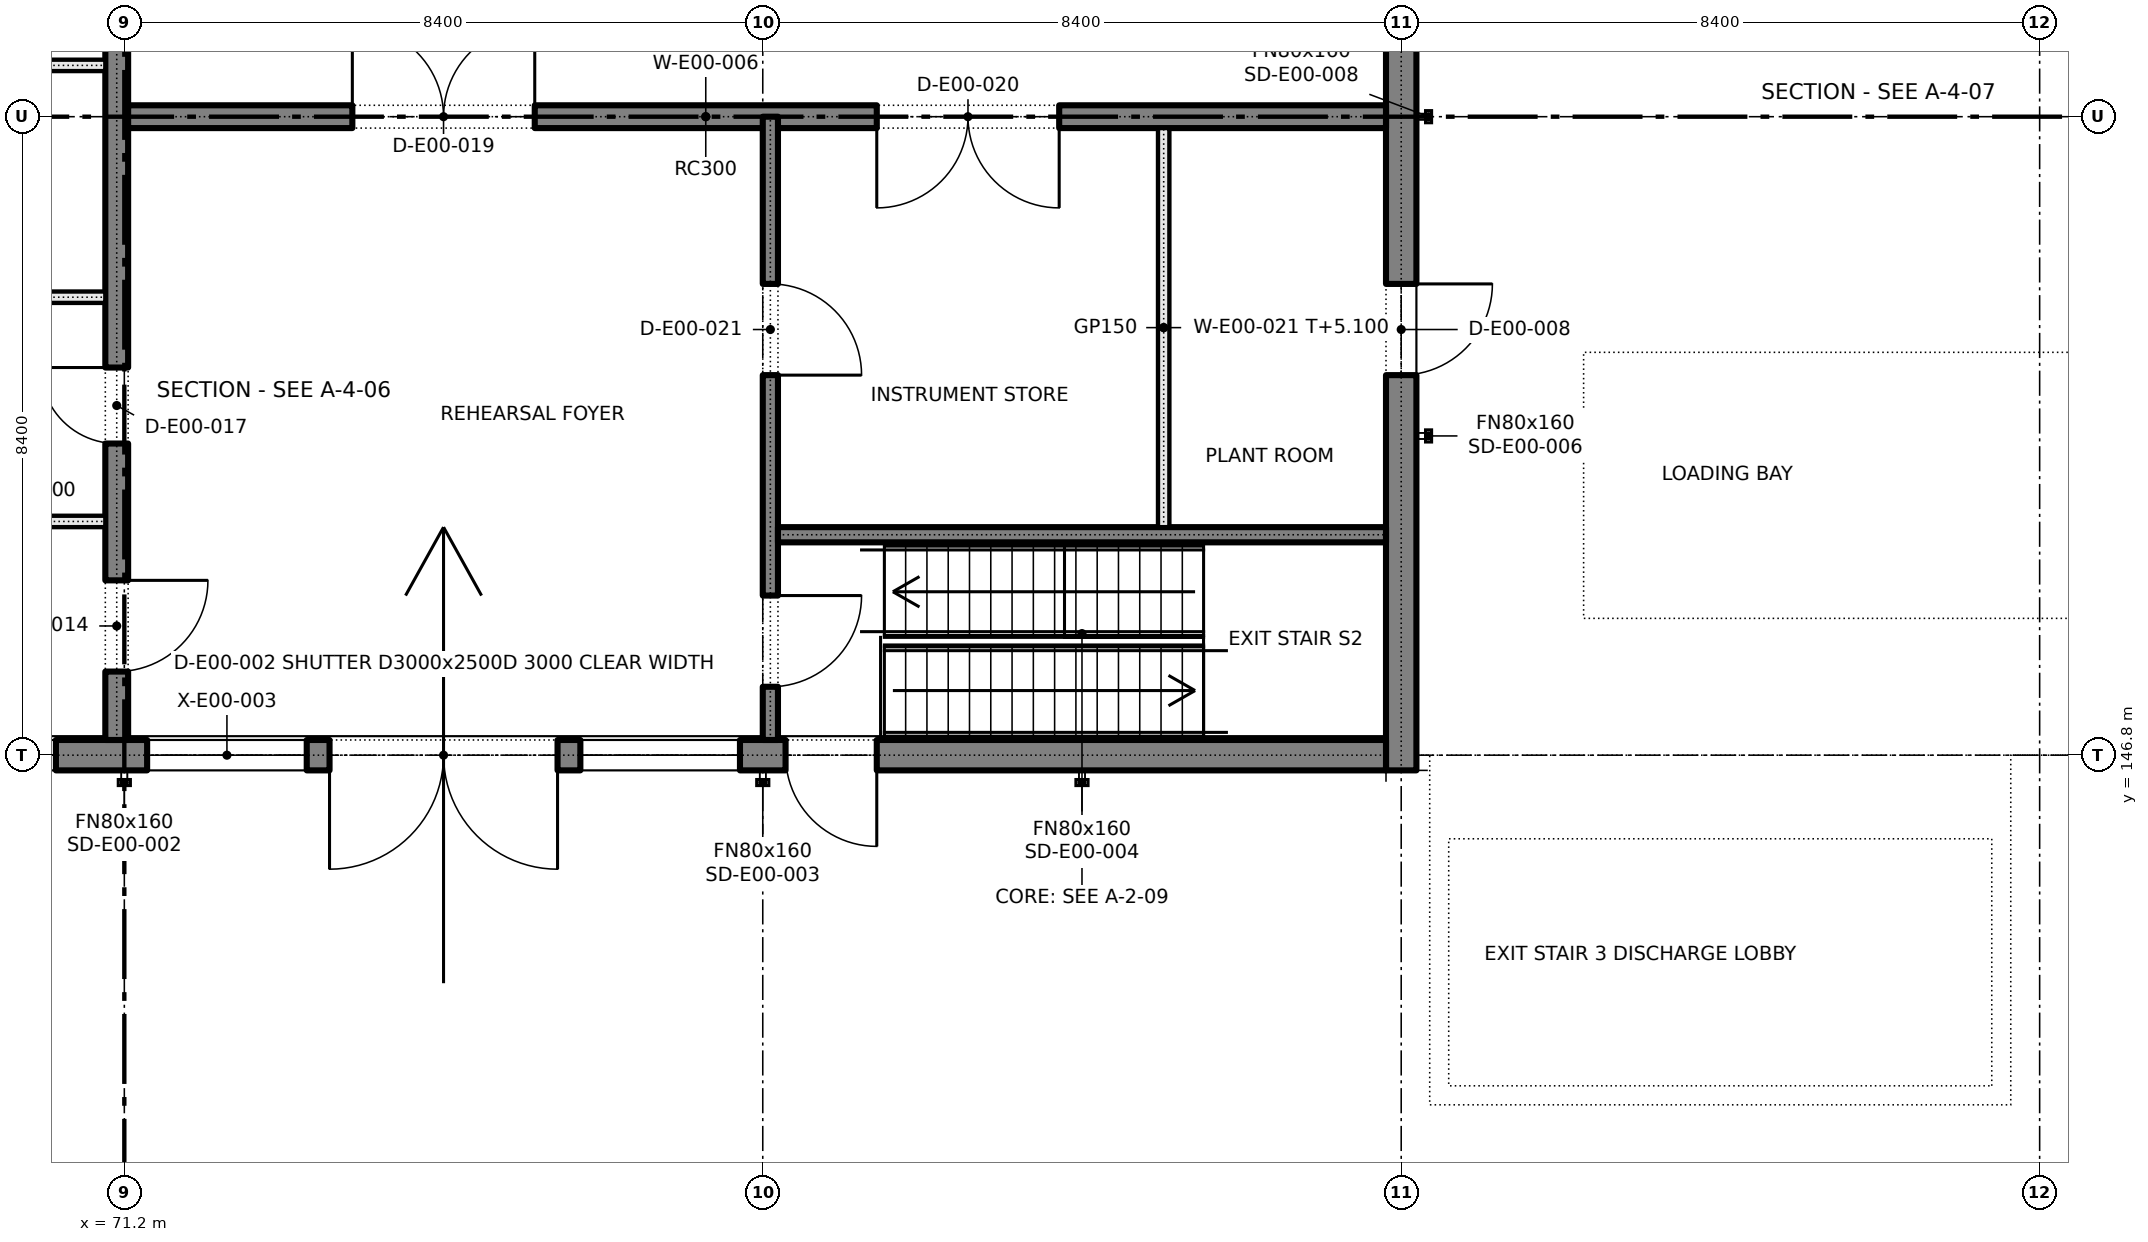
"""IFC4 building model, lengths in metres.
Left out: names, types, materials, properties, quantities, classifications, styles, units other than length and angle.
Written with IfcOpenShell. Run it as: python <this file> out.ifc"""

import sys

from ifc_helpers import new_model, si_unit, direction, frame, frame_2d, origin, place, context, subcontext, project, spatial, rectangle, extrude, element, fill, save


model = new_model("IFC4")
c1 = context("Model", 3, precision=1e-05, world=origin(), true_north=direction((0.0, 1.0)))
c2 = subcontext(c1, "Body", "Model", "MODEL_VIEW")
j1 = project(units=[si_unit("LENGTHUNIT", "METRE"), si_unit("PLANEANGLEUNIT", "RADIAN")], contexts=[c1])
p1 = place(None, origin())
s1 = spatial("IfcSite", under=j1, at=p1, CompositionType="ELEMENT")
p2 = place(p1, origin())
s2 = spatial("IfcBuilding", under=s1, at=p2, CompositionType="ELEMENT")
p3 = place(p2, origin())
s3 = spatial("IfcBuildingStorey", under=s2, at=p3, CompositionType="ELEMENT", Elevation=0.0)
p4 = place(p3, frame((88.0, 146.6, 0.0), z_axis=(0.0, 0.0, 1.0), x_axis=(0.0, 1.0, 0.0)))
e1 = element("IfcWall", 1, at=p4, inside=s3, PredefinedType="SOLIDWALL", context=c2, shape_type="SweptSolid", body=[
    extrude(rectangle(XDim=25.6, YDim=0.4, at=frame_2d((12.8, 0.0))), origin(), (0.0, 0.0, 1.0), 5.4),
])
p5 = place(p4, frame((11.3, 0.0, 0.0)))
e2 = element("IfcOpeningElement", 2, at=p5, cuts=e1, PredefinedType="OPENING", context=c2, shape_type="SweptSolid", body=[
    extrude(rectangle(XDim=3.0, YDim=2.5, at=frame_2d((1.5, 1.25))), frame((0.0, 0.21, 0.0), z_axis=(0.0, -1.0, 0.0), x_axis=(1.0, 0.0, 0.0)), (0.0, 0.0, 1.0), 0.42),
])
p6 = place(p4, frame((22.4, 0.0, 0.0)))
e3 = element("IfcOpeningElement", 3, at=p6, cuts=e1, PredefinedType="OPENING", context=c2, shape_type="SweptSolid", body=[
    extrude(rectangle(XDim=1.8, YDim=2.1, at=frame_2d((0.9, 1.05))), frame((0.0, 0.21, 0.0), z_axis=(0.0, -1.0, 0.0), x_axis=(1.0, 0.0, 0.0)), (0.0, 0.0, 1.0), 0.42),
])
p7 = place(p4, frame((5.2, 0.0, 0.0)))
e4 = element("IfcOpeningElement", 4, at=p7, cuts=e1, PredefinedType="OPENING", context=c2, shape_type="SweptSolid", body=[
    extrude(rectangle(XDim=1.2, YDim=2.1, at=frame_2d((0.6, 1.05))), frame((0.0, 0.21, 0.0), z_axis=(0.0, -1.0, 0.0), x_axis=(1.0, 0.0, 0.0)), (0.0, 0.0, 1.0), 0.42),
])
p8 = place(p3, frame((63.0, 146.8, 0.0), z_axis=(0.0, 0.0, 1.0), x_axis=(1.0, 0.0, 0.0)))
e5 = element("IfcWall", 5, at=p8, inside=s3, PredefinedType="SOLIDWALL", context=c2, shape_type="SweptSolid", body=[
    extrude(rectangle(XDim=24.8, YDim=0.4, at=frame_2d((12.4, 0.0))), origin(), (0.0, 0.0, 1.0), 5.4),
])
p9 = place(p8, frame((10.9, 0.0, 0.0)))
e6 = element("IfcOpeningElement", 6, at=p9, cuts=e5, PredefinedType="OPENING", context=c2, shape_type="SweptSolid", body=[
    extrude(rectangle(XDim=3.0, YDim=2.5, at=frame_2d((1.5, 1.25))), frame((0.0, 0.21, 0.0), z_axis=(0.0, -1.0, 0.0), x_axis=(1.0, 0.0, 0.0)), (0.0, 0.0, 1.0), 0.42),
])
p10 = place(p8, frame((16.9, 0.0, 0.0)))
e7 = element("IfcOpeningElement", 7, at=p10, cuts=e5, PredefinedType="OPENING", context=c2, shape_type="SweptSolid", body=[
    extrude(rectangle(XDim=1.2, YDim=2.1, at=frame_2d((0.6, 1.05))), frame((0.0, 0.21, 0.0), z_axis=(0.0, -1.0, 0.0), x_axis=(1.0, 0.0, 0.0)), (0.0, 0.0, 1.0), 0.42),
])
p11 = place(p8, frame((0.7, 0.0, 0.9)))
e8 = element("IfcOpeningElement", 8, at=p11, cuts=e5, PredefinedType="OPENING", context=c2, shape_type="SweptSolid", body=[
    extrude(rectangle(XDim=2.4, YDim=2.4, at=frame_2d((1.2, 1.2))), frame((0.0, 0.21, 0.0), z_axis=(0.0, -1.0, 0.0), x_axis=(1.0, 0.0, 0.0)), (0.0, 0.0, 1.0), 0.42),
])
p12 = place(p8, frame((4.9, 0.0, 0.9)))
e9 = element("IfcOpeningElement", 9, at=p12, cuts=e5, PredefinedType="OPENING", context=c2, shape_type="SweptSolid", body=[
    extrude(rectangle(XDim=2.4, YDim=2.4, at=frame_2d((1.2, 1.2))), frame((0.0, 0.21, 0.0), z_axis=(0.0, -1.0, 0.0), x_axis=(1.0, 0.0, 0.0)), (0.0, 0.0, 1.0), 0.42),
])
p13 = place(p8, frame((8.5, 0.0, 0.9)))
e10 = element("IfcOpeningElement", 10, at=p13, cuts=e5, PredefinedType="OPENING", context=c2, shape_type="SweptSolid", body=[
    extrude(rectangle(XDim=2.1, YDim=2.4, at=frame_2d((1.05, 1.2))), frame((0.0, 0.21, 0.0), z_axis=(0.0, -1.0, 0.0), x_axis=(1.0, 0.0, 0.0)), (0.0, 0.0, 1.0), 0.42),
])
p14 = place(p8, frame((14.2, 0.0, 0.9)))
e11 = element("IfcOpeningElement", 11, at=p14, cuts=e5, PredefinedType="OPENING", context=c2, shape_type="SweptSolid", body=[
    extrude(rectangle(XDim=2.1, YDim=2.4, at=frame_2d((1.05, 1.2))), frame((0.0, 0.21, 0.0), z_axis=(0.0, -1.0, 0.0), x_axis=(1.0, 0.0, 0.0)), (0.0, 0.0, 1.0), 0.42),
])
p15 = place(p3, frame((71.1, 147.0, 0.0), z_axis=(0.0, 0.0, 1.0), x_axis=(0.0, 1.0, 0.0)))
e12 = element("IfcWall", 12, at=p15, inside=s3, PredefinedType="SOLIDWALL", context=c2, shape_type="SweptSolid", body=[
    extrude(rectangle(XDim=24.8, YDim=0.3, at=frame_2d((12.4, 0.0))), origin(), (0.0, 0.0, 1.0), 5.4),
])
p16 = place(p15, frame((0.9, 0.0, 0.0)))
e13 = element("IfcOpeningElement", 13, at=p16, cuts=e12, PredefinedType="OPENING", context=c2, shape_type="SweptSolid", body=[
    extrude(rectangle(XDim=1.2, YDim=2.1, at=frame_2d((0.6, 1.05))), frame((0.0, 0.16, 0.0), z_axis=(0.0, -1.0, 0.0), x_axis=(1.0, 0.0, 0.0)), (0.0, 0.0, 1.0), 0.32),
])
p17 = place(p15, frame((3.9, 0.0, 0.0)))
e14 = element("IfcOpeningElement", 14, at=p17, cuts=e12, PredefinedType="OPENING", context=c2, shape_type="SweptSolid", body=[
    extrude(rectangle(XDim=1.0, YDim=2.1, at=frame_2d((0.5, 1.05))), frame((0.0, 0.16, 0.0), z_axis=(0.0, -1.0, 0.0), x_axis=(1.0, 0.0, 0.0)), (0.0, 0.0, 1.0), 0.32),
])
p18 = place(p15, frame((15.9, 0.0, 0.0)))
e15 = element("IfcOpeningElement", 15, at=p18, cuts=e12, PredefinedType="OPENING", context=c2, shape_type="SweptSolid", body=[
    extrude(rectangle(XDim=1.0, YDim=2.1, at=frame_2d((0.5, 1.05))), frame((0.0, 0.16, 0.0), z_axis=(0.0, -1.0, 0.0), x_axis=(1.0, 0.0, 0.0)), (0.0, 0.0, 1.0), 0.32),
])
p19 = place(p3, frame((71.25, 155.2, 0.0), z_axis=(0.0, 0.0, 1.0), x_axis=(1.0, 0.0, 0.0)))
e16 = element("IfcWall", 16, at=p19, inside=s3, PredefinedType="SOLIDWALL", context=c2, shape_type="SweptSolid", body=[
    extrude(rectangle(XDim=16.55, YDim=0.3, at=frame_2d((8.275, 0.0))), origin(), (0.0, 0.0, 1.0), 5.4),
])
p20 = place(p19, frame((2.95, 0.0, 0.0)))
e17 = element("IfcOpeningElement", 17, at=p20, cuts=e16, PredefinedType="OPENING", context=c2, shape_type="SweptSolid", body=[
    extrude(rectangle(XDim=2.4, YDim=2.1, at=frame_2d((1.2, 1.05))), frame((0.0, 0.16, 0.0), z_axis=(0.0, -1.0, 0.0), x_axis=(1.0, 0.0, 0.0)), (0.0, 0.0, 1.0), 0.32),
])
p21 = place(p19, frame((9.85, 0.0, 0.0)))
e18 = element("IfcOpeningElement", 18, at=p21, cuts=e16, PredefinedType="OPENING", context=c2, shape_type="SweptSolid", body=[
    extrude(rectangle(XDim=2.4, YDim=2.1, at=frame_2d((1.2, 1.05))), frame((0.0, 0.16, 0.0), z_axis=(0.0, -1.0, 0.0), x_axis=(1.0, 0.0, 0.0)), (0.0, 0.0, 1.0), 0.32),
])
p22 = place(p3, frame((79.7, 147.0, 0.0), z_axis=(0.0, 0.0, 1.0), x_axis=(0.0, 1.0, 0.0)))
e19 = element("IfcWall", 19, at=p22, inside=s3, PredefinedType="SOLIDWALL", context=c2, shape_type="SweptSolid", body=[
    extrude(rectangle(XDim=8.2, YDim=0.2, at=frame_2d((4.1, 0.0))), origin(), (0.0, 0.0, 1.0), 5.4),
])
p23 = place(p22, frame((0.7, 0.0, 0.0)))
e20 = element("IfcOpeningElement", 20, at=p23, cuts=e19, PredefinedType="OPENING", context=c2, shape_type="SweptSolid", body=[
    extrude(rectangle(XDim=1.2, YDim=2.1, at=frame_2d((0.6, 1.05))), frame((0.0, 0.11, 0.0), z_axis=(0.0, -1.0, 0.0), x_axis=(1.0, 0.0, 0.0)), (0.0, 0.0, 1.0), 0.22),
])
p24 = place(p22, frame((4.8, 0.0, 0.0)))
e21 = element("IfcOpeningElement", 21, at=p24, cuts=e19, PredefinedType="OPENING", context=c2, shape_type="SweptSolid", body=[
    extrude(rectangle(XDim=1.2, YDim=2.1, at=frame_2d((0.6, 1.05))), frame((0.0, 0.11, 0.0), z_axis=(0.0, -1.0, 0.0), x_axis=(1.0, 0.0, 0.0)), (0.0, 0.0, 1.0), 0.22),
])
p25 = place(p3, frame((79.8, 149.7, 0.0), z_axis=(0.0, 0.0, 1.0), x_axis=(1.0, 0.0, 0.0)))
e22 = element("IfcWall", 22, at=p25, inside=s3, PredefinedType="SOLIDWALL", context=c2, shape_type="SweptSolid", body=[
    extrude(rectangle(XDim=8.0, YDim=0.2, at=frame_2d((4.0, 0.0))), origin(), (0.0, 0.0, 1.0), 5.4),
])
p26 = place(p3, frame((88.5, 142.325, 0.0), z_axis=(0.0, 0.0, 1.0), x_axis=(1.0, 0.0, 0.0)))
e23 = element("IfcWall", 23, at=p26, inside=s3, PredefinedType="SOLIDWALL", context=c2, shape_type="SweptSolid", body=[
    extrude(rectangle(XDim=7.395, YDim=0.25, at=frame_2d((3.698, 0.0))), origin(), (0.0, 0.0, 1.0), 2.8),
])
p27 = place(p26, frame((0.55, 0.0, 0.0)))
e24 = element("IfcOpeningElement", 24, at=p27, cuts=e23, PredefinedType="OPENING", context=c2, shape_type="SweptSolid", body=[
    extrude(rectangle(XDim=1.1, YDim=2.1, at=frame_2d((0.55, 1.05))), frame((0.0, 0.135, 0.0), z_axis=(0.0, -1.0, 0.0), x_axis=(1.0, 0.0, 0.0)), (0.0, 0.0, 1.0), 0.27),
])
p28 = place(p3, frame((88.5, 145.825, 0.0), z_axis=(0.0, 0.0, 1.0), x_axis=(1.0, 0.0, 0.0)))
e25 = element("IfcWall", 25, at=p28, inside=s3, PredefinedType="SOLIDWALL", context=c2, shape_type="SweptSolid", body=[
    extrude(rectangle(XDim=7.395, YDim=0.25, at=frame_2d((3.698, 0.0))), origin(), (0.0, 0.0, 1.0), 2.8),
])
for number, where, z_axis, x_axis in (
    (26, (88.5, 142.325, 0.0), (0.0, 0.0, 1.0), (0.0, 1.0, 0.0)),
    (27, (95.895, 142.325, 0.0), (0.0, 0.0, 1.0), (0.0, 1.0, 0.0)),
):
    element("IfcWall", number, at=place(p3, frame(where, z_axis=z_axis, x_axis=x_axis)), inside=s3, PredefinedType="SOLIDWALL", context=c2, shape_type="SweptSolid", body=[
        extrude(rectangle(XDim=3.5, YDim=0.25, at=frame_2d((1.75, 0.0))), origin(), (0.0, 0.0, 1.0), 2.8),
    ])
for number, where, z_axis, x_axis in (
    (28, (64.8, 152.825, 0.0), (0.0, 0.0, 1.0), (1.0, 0.0, 0.0)),
    (29, (64.8, 155.875, 0.0), (0.0, 0.0, 1.0), (1.0, 0.0, 0.0)),
):
    element("IfcWall", number, at=place(p3, frame(where, z_axis=z_axis, x_axis=x_axis)), inside=s3, PredefinedType="PARTITIONING", context=c2, shape_type="SweptSolid", body=[
        extrude(rectangle(XDim=6.15, YDim=0.15, at=frame_2d((3.075, 0.0))), origin(), (0.0, 0.0, 1.0), 5.1),
    ])
p29 = place(p3, frame((67.6, 149.875, 0.0), z_axis=(0.0, 0.0, 1.0), x_axis=(1.0, 0.0, 0.0)))
e30 = element("IfcWall", 30, at=p29, inside=s3, PredefinedType="PARTITIONING", context=c2, shape_type="SweptSolid", body=[
    extrude(rectangle(XDim=3.35, YDim=0.15, at=frame_2d((1.675, 0.0))), origin(), (0.0, 0.0, 1.0), 5.1),
])
p30 = place(p3, frame((84.875, 149.8, 0.0), z_axis=(0.0, 0.0, 1.0), x_axis=(0.0, 1.0, 0.0)))
e31 = element("IfcWall", 31, at=p30, inside=s3, PredefinedType="PARTITIONING", context=c2, shape_type="SweptSolid", body=[
    extrude(rectangle(XDim=5.25, YDim=0.15, at=frame_2d((2.625, 0.0))), origin(), (0.0, 0.0, 1.0), 5.1),
])
p31 = place(p27, frame((1.1, 0.0, 0.0), z_axis=(0.0, 0.0, 1.0), x_axis=(-1.0, 0.0, 0.0)))
e32 = element("IfcDoor", 32, at=p31, inside=s3, OperationType="SINGLE_SWING_RIGHT", PredefinedType="DOOR", context=c2, shape_type="SweptSolid", body=[
    extrude(rectangle(XDim=1.1, YDim=2.1, at=frame_2d((0.55, 1.05))), frame((0.0, 0.025, 0.0), z_axis=(0.0, -1.0, 0.0), x_axis=(1.0, 0.0, 0.0)), (0.0, 0.0, 1.0), 0.05),
])
fill(e24, e32)
p32 = place(p9, frame((3.0, 0.0, 0.0), z_axis=(0.0, 0.0, 1.0), x_axis=(-1.0, 0.0, 0.0)))
e33 = element("IfcDoor", 33, at=p32, inside=s3, OperationType="DOUBLE_DOOR_SINGLE_SWING", PredefinedType="DOOR", context=c2, shape_type="SweptSolid", body=[
    extrude(rectangle(XDim=3.0, YDim=2.5, at=frame_2d((1.5, 1.25))), frame((0.0, 0.025, 0.0), z_axis=(0.0, -1.0, 0.0), x_axis=(1.0, 0.0, 0.0)), (0.0, 0.0, 1.0), 0.05),
])
fill(e6, e33)
p33 = place(p10, frame((1.2, 0.0, 0.0), z_axis=(0.0, 0.0, 1.0), x_axis=(-1.0, 0.0, 0.0)))
e34 = element("IfcDoor", 34, at=p33, inside=s3, OperationType="SINGLE_SWING_LEFT", PredefinedType="DOOR", context=c2, shape_type="SweptSolid", body=[
    extrude(rectangle(XDim=1.2, YDim=2.1, at=frame_2d((0.6, 1.05))), frame((0.0, 0.025, 0.0), z_axis=(0.0, -1.0, 0.0), x_axis=(1.0, 0.0, 0.0)), (0.0, 0.0, 1.0), 0.05),
])
fill(e7, e34)
p34 = place(p7, frame((1.2, 0.0, 0.0), z_axis=(0.0, 0.0, 1.0), x_axis=(-1.0, 0.0, 0.0)))
e35 = element("IfcDoor", 35, at=p34, inside=s3, OperationType="SINGLE_SWING_LEFT", PredefinedType="DOOR", context=c2, shape_type="SweptSolid", body=[
    extrude(rectangle(XDim=1.2, YDim=2.1, at=frame_2d((0.6, 1.05))), frame((0.0, 0.025, 0.0), z_axis=(0.0, -1.0, 0.0), x_axis=(1.0, 0.0, 0.0)), (0.0, 0.0, 1.0), 0.05),
])
fill(e4, e35)
p35 = place(p12, origin())
e36 = element("IfcWindow", 36, at=p35, inside=s3, PartitioningType="SINGLE_PANEL", PredefinedType="WINDOW", context=c2, shape_type="SweptSolid", body=[
    extrude(rectangle(XDim=2.4, YDim=2.4, at=frame_2d((1.2, 1.2))), frame((0.0, 0.03, 0.0), z_axis=(0.0, -1.0, 0.0), x_axis=(1.0, 0.0, 0.0)), (0.0, 0.0, 1.0), 0.06),
])
fill(e9, e36)
p36 = place(p13, origin())
e37 = element("IfcWindow", 37, at=p36, inside=s3, PartitioningType="SINGLE_PANEL", PredefinedType="WINDOW", context=c2, shape_type="SweptSolid", body=[
    extrude(rectangle(XDim=2.1, YDim=2.4, at=frame_2d((1.05, 1.2))), frame((0.0, 0.03, 0.0), z_axis=(0.0, -1.0, 0.0), x_axis=(1.0, 0.0, 0.0)), (0.0, 0.0, 1.0), 0.06),
])
fill(e10, e37)
p37 = place(p14, origin())
e38 = element("IfcWindow", 38, at=p37, inside=s3, PartitioningType="SINGLE_PANEL", PredefinedType="WINDOW", context=c2, shape_type="SweptSolid", body=[
    extrude(rectangle(XDim=2.1, YDim=2.4, at=frame_2d((1.05, 1.2))), frame((0.0, 0.03, 0.0), z_axis=(0.0, -1.0, 0.0), x_axis=(1.0, 0.0, 0.0)), (0.0, 0.0, 1.0), 0.06),
])
fill(e11, e38)
p38 = place(p16, frame((1.2, 0.0, 0.0), z_axis=(0.0, 0.0, 1.0), x_axis=(-1.0, 0.0, 0.0)))
e39 = element("IfcDoor", 39, at=p38, inside=s3, OperationType="SINGLE_SWING_LEFT", PredefinedType="DOOR", context=c2, shape_type="SweptSolid", body=[
    extrude(rectangle(XDim=1.2, YDim=2.1, at=frame_2d((0.6, 1.05))), frame((0.0, 0.025, 0.0), z_axis=(0.0, -1.0, 0.0), x_axis=(1.0, 0.0, 0.0)), (0.0, 0.0, 1.0), 0.05),
])
fill(e13, e39)
p39 = place(p23, frame((1.2, 0.0, 0.0), z_axis=(0.0, 0.0, 1.0), x_axis=(-1.0, 0.0, 0.0)))
e40 = element("IfcDoor", 40, at=p39, inside=s3, OperationType="SINGLE_SWING_LEFT", PredefinedType="DOOR", context=c2, shape_type="SweptSolid", body=[
    extrude(rectangle(XDim=1.2, YDim=2.1, at=frame_2d((0.6, 1.05))), frame((0.0, 0.025, 0.0), z_axis=(0.0, -1.0, 0.0), x_axis=(1.0, 0.0, 0.0)), (0.0, 0.0, 1.0), 0.05),
])
fill(e20, e40)
p40 = place(p17, origin())
e41 = element("IfcDoor", 41, at=p40, inside=s3, OperationType="SINGLE_SWING_RIGHT", PredefinedType="DOOR", context=c2, shape_type="SweptSolid", body=[
    extrude(rectangle(XDim=1.0, YDim=2.1, at=frame_2d((0.5, 1.05))), frame((0.0, 0.025, 0.0), z_axis=(0.0, -1.0, 0.0), x_axis=(1.0, 0.0, 0.0)), (0.0, 0.0, 1.0), 0.05),
])
fill(e14, e41)
p41 = place(p20, origin())
e42 = element("IfcDoor", 42, at=p41, inside=s3, OperationType="DOUBLE_DOOR_SINGLE_SWING", PredefinedType="DOOR", context=c2, shape_type="SweptSolid", body=[
    extrude(rectangle(XDim=2.4, YDim=2.1, at=frame_2d((1.2, 1.05))), frame((0.0, 0.025, 0.0), z_axis=(0.0, -1.0, 0.0), x_axis=(1.0, 0.0, 0.0)), (0.0, 0.0, 1.0), 0.05),
])
fill(e17, e42)
p42 = place(p21, frame((2.4, 0.0, 0.0), z_axis=(0.0, 0.0, 1.0), x_axis=(-1.0, 0.0, 0.0)))
e43 = element("IfcDoor", 43, at=p42, inside=s3, OperationType="DOUBLE_DOOR_SINGLE_SWING", PredefinedType="DOOR", context=c2, shape_type="SweptSolid", body=[
    extrude(rectangle(XDim=2.4, YDim=2.1, at=frame_2d((1.2, 1.05))), frame((0.0, 0.025, 0.0), z_axis=(0.0, -1.0, 0.0), x_axis=(1.0, 0.0, 0.0)), (0.0, 0.0, 1.0), 0.05),
])
fill(e18, e43)
p43 = place(p24, frame((1.2, 0.0, 0.0), z_axis=(0.0, 0.0, 1.0), x_axis=(-1.0, 0.0, 0.0)))
e44 = element("IfcDoor", 44, at=p43, inside=s3, OperationType="SINGLE_SWING_RIGHT", PredefinedType="DOOR", context=c2, shape_type="SweptSolid", body=[
    extrude(rectangle(XDim=1.2, YDim=2.1, at=frame_2d((0.6, 1.05))), frame((0.0, 0.025, 0.0), z_axis=(0.0, -1.0, 0.0), x_axis=(1.0, 0.0, 0.0)), (0.0, 0.0, 1.0), 0.05),
])
fill(e21, e44)
save(model, sys.argv[1])
